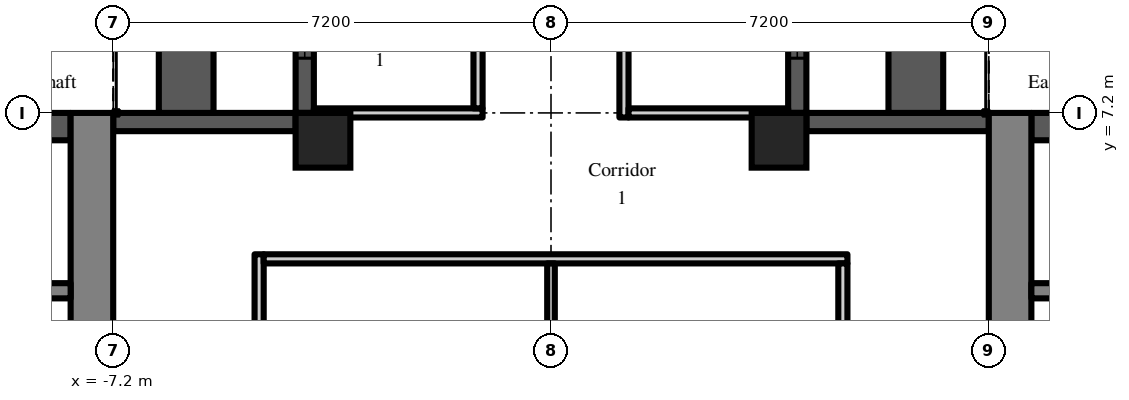
"""IFC4 building model, lengths in metres.
Left out: names, types, materials, properties, quantities, classifications, styles, units other than length and angle.
Written with IfcOpenShell. Run it as: python <this file> out.ifc"""

import sys

from ifc_helpers import new_model, si_unit, direction, frame, frame_2d, origin, origin_2d, place, context, subcontext, project, spatial, rectangle, extrude, element, fill, save


model = new_model("IFC4")
c1 = context("Model", 3, precision=1e-05, world=origin(), true_north=direction((0.0, 1.0)))
c2 = subcontext(c1, "Body", "Model", "MODEL_VIEW")
j1 = project(units=[si_unit("LENGTHUNIT", "METRE"), si_unit("PLANEANGLEUNIT", "RADIAN")], contexts=[c1])
p1 = place(None, origin())
s1 = spatial("IfcSite", under=j1, at=p1, CompositionType="ELEMENT")
p2 = place(p1, origin())
s2 = spatial("IfcBuilding", under=s1, at=p2, CompositionType="ELEMENT")
p3 = place(p2, frame((0.0, 0.0, 156.3)))
s3 = spatial("IfcBuildingStorey", under=s2, at=p3, CompositionType="ELEMENT", Elevation=156.3)
for number, where, z_axis, x_axis in (
    (1, (-3.75, 6.75, 0.0), (0.0, 0.0, 1.0), (1.0, 0.0, 0.0)),
    (2, (3.75, 6.75, 0.0), (0.0, 0.0, 1.0), (1.0, 0.0, 0.0)),
):
    element("IfcColumn", number, at=place(p3, frame(where, z_axis=z_axis, x_axis=x_axis)), inside=s3, PredefinedType="COLUMN", context=c2, shape_type="SweptSolid", body=[
        extrude(rectangle(XDim=0.9, YDim=0.9, at=origin_2d()), origin(), (0.0, 0.0, 1.0), 3.0),
    ])
p4 = place(p3, frame((7.2, 7.05, 0.0), z_axis=(0.0, 0.0, 1.0), x_axis=(-1.0, 0.0, 0.0)))
e3 = element("IfcWall", 3, at=p4, inside=s3, PredefinedType="SOLIDWALL", context=c2, shape_type="SweptSolid", body=[
    extrude(rectangle(XDim=3.0, YDim=0.3, at=frame_2d((1.5, 0.0))), origin(), (0.0, 0.0, 1.0), 2.2),
])
p5 = place(p3, frame((4.05, 7.2, 0.0), z_axis=(0.0, 0.0, 1.0), x_axis=(0.0, 1.0, 0.0)))
e4 = element("IfcWall", 4, at=p5, inside=s3, PredefinedType="SOLIDWALL", context=c2, shape_type="SweptSolid", body=[
    extrude(rectangle(XDim=7.2, YDim=0.3, at=frame_2d((3.6, 0.0))), origin(), (0.0, 0.0, 1.0), 2.2),
])
p6 = place(p5, frame((3.0, 0.0, 0.0)))
e5 = element("IfcOpeningElement", 5, at=p6, cuts=e4, PredefinedType="OPENING", context=c2, shape_type="SweptSolid", body=[
    extrude(rectangle(XDim=1.2, YDim=2.05, at=frame_2d((0.6, 1.025))), frame((0.0, 0.16, 0.0), z_axis=(0.0, -1.0, 0.0), x_axis=(1.0, 0.0, 0.0)), (0.0, 0.0, 1.0), 0.32),
])
p7 = place(p5, frame((0.9, 0.0, 0.2)))
e6 = element("IfcOpeningElement", 6, at=p7, cuts=e4, PredefinedType="OPENING", context=c2, shape_type="SweptSolid", body=[
    extrude(rectangle(XDim=1.8, YDim=1.85, at=frame_2d((0.9, 0.925))), frame((0.0, 0.16, 0.0), z_axis=(0.0, -1.0, 0.0), x_axis=(1.0, 0.0, 0.0)), (0.0, 0.0, 1.0), 0.32),
])
p8 = place(p5, frame((4.5, 0.0, 0.2)))
e7 = element("IfcOpeningElement", 7, at=p8, cuts=e4, PredefinedType="OPENING", context=c2, shape_type="SweptSolid", body=[
    extrude(rectangle(XDim=1.8, YDim=1.85, at=frame_2d((0.9, 0.925))), frame((0.0, 0.16, 0.0), z_axis=(0.0, -1.0, 0.0), x_axis=(1.0, 0.0, 0.0)), (0.0, 0.0, 1.0), 0.32),
])
p9 = place(p3, frame((-4.05, 14.4, 0.0), z_axis=(0.0, 0.0, 1.0), x_axis=(0.0, -1.0, 0.0)))
e8 = element("IfcWall", 8, at=p9, inside=s3, PredefinedType="SOLIDWALL", context=c2, shape_type="SweptSolid", body=[
    extrude(rectangle(XDim=7.2, YDim=0.3, at=frame_2d((3.6, 0.0))), origin(), (0.0, 0.0, 1.0), 2.2),
])
p10 = place(p9, frame((3.0, 0.0, 0.0)))
e9 = element("IfcOpeningElement", 9, at=p10, cuts=e8, PredefinedType="OPENING", context=c2, shape_type="SweptSolid", body=[
    extrude(rectangle(XDim=1.2, YDim=2.05, at=frame_2d((0.6, 1.025))), frame((0.0, 0.16, 0.0), z_axis=(0.0, -1.0, 0.0), x_axis=(1.0, 0.0, 0.0)), (0.0, 0.0, 1.0), 0.32),
])
p11 = place(p9, frame((0.9, 0.0, 0.2)))
e10 = element("IfcOpeningElement", 10, at=p11, cuts=e8, PredefinedType="OPENING", context=c2, shape_type="SweptSolid", body=[
    extrude(rectangle(XDim=1.8, YDim=1.85, at=frame_2d((0.9, 0.925))), frame((0.0, 0.16, 0.0), z_axis=(0.0, -1.0, 0.0), x_axis=(1.0, 0.0, 0.0)), (0.0, 0.0, 1.0), 0.32),
])
p12 = place(p9, frame((4.5, 0.0, 0.2)))
e11 = element("IfcOpeningElement", 11, at=p12, cuts=e8, PredefinedType="OPENING", context=c2, shape_type="SweptSolid", body=[
    extrude(rectangle(XDim=1.8, YDim=1.85, at=frame_2d((0.9, 0.925))), frame((0.0, 0.16, 0.0), z_axis=(0.0, -1.0, 0.0), x_axis=(1.0, 0.0, 0.0)), (0.0, 0.0, 1.0), 0.32),
])
p13 = place(p3, frame((-4.2, 7.05, 0.0), z_axis=(0.0, 0.0, 1.0), x_axis=(-1.0, 0.0, 0.0)))
e12 = element("IfcWall", 12, at=p13, inside=s3, PredefinedType="SOLIDWALL", context=c2, shape_type="SweptSolid", body=[
    extrude(rectangle(XDim=3.0, YDim=0.3, at=frame_2d((1.5, 0.0))), origin(), (0.0, 0.0, 1.0), 2.2),
])
for number, where, z_axis, x_axis in (
    (13, (6.0, 7.2, 0.0), (0.0, 0.0, 1.0), (0.0, 1.0, 0.0)),
    (14, (-6.0, 7.2, 0.0), (0.0, 0.0, 1.0), (0.0, 1.0, 0.0)),
):
    element("IfcWall", number, at=place(p3, frame(where, z_axis=z_axis, x_axis=x_axis)), inside=s3, PredefinedType="PARAPET", context=c2, shape_type="SweptSolid", body=[
        extrude(rectangle(XDim=7.2, YDim=0.9, at=frame_2d((3.6, 0.0))), origin(), (0.0, 0.0, 1.0), 0.8),
    ])
p14 = place(p3, frame((7.55, -7.2, 0.0), z_axis=(0.0, 0.0, 1.0), x_axis=(0.0, 1.0, 0.0)))
e15 = element("IfcWall", 15, at=p14, inside=s3, PredefinedType="SHEAR", context=c2, shape_type="SweptSolid", body=[
    extrude(rectangle(XDim=14.4, YDim=0.7, at=frame_2d((7.2, 0.0))), origin(), (0.0, 0.0, 1.0), 2.6),
])
p15 = place(p14, frame((6.0, 0.0, 0.0)))
e16 = element("IfcOpeningElement", 16, at=p15, cuts=e15, PredefinedType="OPENING", context=c2, shape_type="SweptSolid", body=[
    extrude(rectangle(XDim=2.4, YDim=2.2, at=frame_2d((1.2, 1.1))), frame((0.0, 0.36, 0.0), z_axis=(0.0, -1.0, 0.0), x_axis=(1.0, 0.0, 0.0)), (0.0, 0.0, 1.0), 0.72),
])
p16 = place(p3, frame((7.9, 6.975, 0.0), z_axis=(0.0, 0.0, 1.0), x_axis=(1.0, 0.0, 0.0)))
e17 = element("IfcWall", 17, at=p16, inside=s3, PredefinedType="SHEAR", context=c2, shape_type="SweptSolid", body=[
    extrude(rectangle(XDim=12.95, YDim=0.45, at=frame_2d((6.475, 0.0))), origin(), (0.0, 0.0, 1.0), 2.6),
])
p17 = place(p3, frame((7.9, 4.275, 0.0), z_axis=(0.0, 0.0, 1.0), x_axis=(1.0, 0.0, 0.0)))
e18 = element("IfcWall", 18, at=p17, inside=s3, PredefinedType="SHEAR", context=c2, shape_type="SweptSolid", body=[
    extrude(rectangle(XDim=1.95, YDim=0.25, at=frame_2d((0.975, 0.0))), origin(), (0.0, 0.0, 1.0), 2.6),
])
p18 = place(p3, frame((-7.55, -7.2, 0.0), z_axis=(0.0, 0.0, 1.0), x_axis=(0.0, 1.0, 0.0)))
e19 = element("IfcWall", 19, at=p18, inside=s3, PredefinedType="SHEAR", context=c2, shape_type="SweptSolid", body=[
    extrude(rectangle(XDim=14.4, YDim=0.7, at=frame_2d((7.2, 0.0))), origin(), (0.0, 0.0, 1.0), 2.6),
])
p19 = place(p18, frame((6.0, 0.0, 0.0)))
e20 = element("IfcOpeningElement", 20, at=p19, cuts=e19, PredefinedType="OPENING", context=c2, shape_type="SweptSolid", body=[
    extrude(rectangle(XDim=2.4, YDim=2.2, at=frame_2d((1.2, 1.1))), frame((0.0, 0.36, 0.0), z_axis=(0.0, -1.0, 0.0), x_axis=(1.0, 0.0, 0.0)), (0.0, 0.0, 1.0), 0.72),
])
p20 = place(p3, frame((-7.9, 6.975, 0.0), z_axis=(0.0, 0.0, 1.0), x_axis=(-1.0, 0.0, 0.0)))
e21 = element("IfcWall", 21, at=p20, inside=s3, PredefinedType="SHEAR", context=c2, shape_type="SweptSolid", body=[
    extrude(rectangle(XDim=12.95, YDim=0.45, at=frame_2d((6.475, 0.0))), origin(), (0.0, 0.0, 1.0), 2.6),
])
p21 = place(p3, frame((-7.9, 4.275, 0.0), z_axis=(0.0, 0.0, 1.0), x_axis=(-1.0, 0.0, 0.0)))
e22 = element("IfcWall", 22, at=p21, inside=s3, PredefinedType="SHEAR", context=c2, shape_type="SweptSolid", body=[
    extrude(rectangle(XDim=1.95, YDim=0.25, at=frame_2d((0.975, 0.0))), origin(), (0.0, 0.0, 1.0), 2.6),
])
p22 = place(p3, frame((-4.8, -4.875, 0.0), z_axis=(0.0, 0.0, 1.0), x_axis=(0.0, 1.0, 0.0)))
e23 = element("IfcWall", 23, at=p22, inside=s3, PredefinedType="PARTITIONING", context=c2, shape_type="SweptSolid", body=[
    extrude(rectangle(XDim=9.75, YDim=0.15, at=frame_2d((4.875, 0.0))), origin(), (0.0, 0.0, 1.0), 2.6),
])
p23 = place(p22, frame((5.575, 0.0, 0.0)))
e24 = element("IfcOpeningElement", 24, at=p23, cuts=e23, PredefinedType="OPENING", context=c2, shape_type="SweptSolid", body=[
    extrude(rectangle(XDim=1.0, YDim=2.1, at=frame_2d((0.5, 1.05))), frame((0.0, 0.085, 0.0), z_axis=(0.0, -1.0, 0.0), x_axis=(1.0, 0.0, 0.0)), (0.0, 0.0, 1.0), 0.17),
])
p24 = place(p3, frame((-4.725, 4.8, 0.0), z_axis=(0.0, 0.0, 1.0), x_axis=(1.0, 0.0, 0.0)))
e25 = element("IfcWall", 25, at=p24, inside=s3, PredefinedType="PARTITIONING", context=c2, shape_type="SweptSolid", body=[
    extrude(rectangle(XDim=9.6, YDim=0.15, at=frame_2d((4.8, 0.0))), origin(), (0.0, 0.0, 1.0), 2.6),
])
p25 = place(p3, frame((-3.9, 7.2, 0.0), z_axis=(0.0, 0.0, 1.0), x_axis=(1.0, 0.0, 0.0)))
e26 = element("IfcWall", 26, at=p25, inside=s3, PredefinedType="PARTITIONING", context=c2, shape_type="SweptSolid", body=[
    extrude(rectangle(XDim=2.775, YDim=0.15, at=frame_2d((1.387, 0.0))), origin(), (0.0, 0.0, 1.0), 2.6),
])
p26 = place(p3, frame((-1.2, 7.275, 0.0), z_axis=(0.0, 0.0, 1.0), x_axis=(0.0, 1.0, 0.0)))
e27 = element("IfcWall", 27, at=p26, inside=s3, PredefinedType="PARTITIONING", context=c2, shape_type="SweptSolid", body=[
    extrude(rectangle(XDim=14.025, YDim=0.15, at=frame_2d((7.013, 0.0))), origin(), (0.0, 0.0, 1.0), 2.6),
])
p27 = place(p26, frame((5.275, 0.0, 0.0)))
e28 = element("IfcOpeningElement", 28, at=p27, cuts=e27, PredefinedType="OPENING", context=c2, shape_type="SweptSolid", body=[
    extrude(rectangle(XDim=0.9, YDim=2.1, at=frame_2d((0.45, 1.05))), frame((0.0, 0.085, 0.0), z_axis=(0.0, -1.0, 0.0), x_axis=(1.0, 0.0, 0.0)), (0.0, 0.0, 1.0), 0.17),
])
p28 = place(p26, frame((1.675, 0.0, 0.0)))
e29 = element("IfcOpeningElement", 29, at=p28, cuts=e27, PredefinedType="OPENING", context=c2, shape_type="SweptSolid", body=[
    extrude(rectangle(XDim=0.9, YDim=2.1, at=frame_2d((0.45, 1.05))), frame((0.0, 0.085, 0.0), z_axis=(0.0, -1.0, 0.0), x_axis=(1.0, 0.0, 0.0)), (0.0, 0.0, 1.0), 0.17),
])
p29 = place(p26, frame((7.575, 0.0, 0.0)))
e30 = element("IfcOpeningElement", 30, at=p29, cuts=e27, PredefinedType="OPENING", context=c2, shape_type="SweptSolid", body=[
    extrude(rectangle(XDim=0.9, YDim=2.1, at=frame_2d((0.45, 1.05))), frame((0.0, 0.085, 0.0), z_axis=(0.0, -1.0, 0.0), x_axis=(1.0, 0.0, 0.0)), (0.0, 0.0, 1.0), 0.17),
])
p30 = place(p26, frame((9.375, 0.0, 0.0)))
e31 = element("IfcOpeningElement", 31, at=p30, cuts=e27, PredefinedType="OPENING", context=c2, shape_type="SweptSolid", body=[
    extrude(rectangle(XDim=0.9, YDim=2.1, at=frame_2d((0.45, 1.05))), frame((0.0, 0.085, 0.0), z_axis=(0.0, -1.0, 0.0), x_axis=(1.0, 0.0, 0.0)), (0.0, 0.0, 1.0), 0.17),
])
p31 = place(p26, frame((11.175, 0.0, 0.0)))
e32 = element("IfcOpeningElement", 32, at=p31, cuts=e27, PredefinedType="OPENING", context=c2, shape_type="SweptSolid", body=[
    extrude(rectangle(XDim=0.9, YDim=2.1, at=frame_2d((0.45, 1.05))), frame((0.0, 0.085, 0.0), z_axis=(0.0, -1.0, 0.0), x_axis=(1.0, 0.0, 0.0)), (0.0, 0.0, 1.0), 0.17),
])
p32 = place(p26, frame((12.825, 0.0, 0.0)))
e33 = element("IfcOpeningElement", 33, at=p32, cuts=e27, PredefinedType="OPENING", context=c2, shape_type="SweptSolid", body=[
    extrude(rectangle(XDim=0.9, YDim=2.1, at=frame_2d((0.45, 1.05))), frame((0.0, 0.085, 0.0), z_axis=(0.0, -1.0, 0.0), x_axis=(1.0, 0.0, 0.0)), (0.0, 0.0, 1.0), 0.17),
])
p33 = place(p3, frame((0.0, -2.325, 0.0), z_axis=(0.0, 0.0, 1.0), x_axis=(0.0, 1.0, 0.0)))
e34 = element("IfcWall", 34, at=p33, inside=s3, PredefinedType="PARTITIONING", context=c2, shape_type="SweptSolid", body=[
    extrude(rectangle(XDim=7.05, YDim=0.125, at=frame_2d((3.525, 0.0))), origin(), (0.0, 0.0, 1.0), 2.6),
])
p34 = place(p3, frame((1.2, 7.125, 0.0), z_axis=(0.0, 0.0, 1.0), x_axis=(0.0, 1.0, 0.0)))
e35 = element("IfcWall", 35, at=p34, inside=s3, PredefinedType="PARTITIONING", context=c2, shape_type="SweptSolid", body=[
    extrude(rectangle(XDim=14.175, YDim=0.15, at=frame_2d((7.087, 0.0))), origin(), (0.0, 0.0, 1.0), 2.6),
])
p35 = place(p34, frame((1.425, 0.0, 0.0)))
e36 = element("IfcOpeningElement", 36, at=p35, cuts=e35, PredefinedType="OPENING", context=c2, shape_type="SweptSolid", body=[
    extrude(rectangle(XDim=0.9, YDim=2.1, at=frame_2d((0.45, 1.05))), frame((0.0, 0.085, 0.0), z_axis=(0.0, -1.0, 0.0), x_axis=(1.0, 0.0, 0.0)), (0.0, 0.0, 1.0), 0.17),
])
p36 = place(p34, frame((7.725, 0.0, 0.0)))
e37 = element("IfcOpeningElement", 37, at=p36, cuts=e35, PredefinedType="OPENING", context=c2, shape_type="SweptSolid", body=[
    extrude(rectangle(XDim=0.9, YDim=2.1, at=frame_2d((0.45, 1.05))), frame((0.0, 0.085, 0.0), z_axis=(0.0, -1.0, 0.0), x_axis=(1.0, 0.0, 0.0)), (0.0, 0.0, 1.0), 0.17),
])
p37 = place(p34, frame((9.525, 0.0, 0.0)))
e38 = element("IfcOpeningElement", 38, at=p37, cuts=e35, PredefinedType="OPENING", context=c2, shape_type="SweptSolid", body=[
    extrude(rectangle(XDim=0.9, YDim=2.1, at=frame_2d((0.45, 1.05))), frame((0.0, 0.085, 0.0), z_axis=(0.0, -1.0, 0.0), x_axis=(1.0, 0.0, 0.0)), (0.0, 0.0, 1.0), 0.17),
])
p38 = place(p34, frame((11.325, 0.0, 0.0)))
e39 = element("IfcOpeningElement", 39, at=p38, cuts=e35, PredefinedType="OPENING", context=c2, shape_type="SweptSolid", body=[
    extrude(rectangle(XDim=0.9, YDim=2.1, at=frame_2d((0.45, 1.05))), frame((0.0, 0.085, 0.0), z_axis=(0.0, -1.0, 0.0), x_axis=(1.0, 0.0, 0.0)), (0.0, 0.0, 1.0), 0.17),
])
p39 = place(p34, frame((12.975, 0.0, 0.0)))
e40 = element("IfcOpeningElement", 40, at=p39, cuts=e35, PredefinedType="OPENING", context=c2, shape_type="SweptSolid", body=[
    extrude(rectangle(XDim=0.9, YDim=2.1, at=frame_2d((0.45, 1.05))), frame((0.0, 0.085, 0.0), z_axis=(0.0, -1.0, 0.0), x_axis=(1.0, 0.0, 0.0)), (0.0, 0.0, 1.0), 0.17),
])
p40 = place(p3, frame((1.275, 7.2, 0.0), z_axis=(0.0, 0.0, 1.0), x_axis=(1.0, 0.0, 0.0)))
e41 = element("IfcWall", 41, at=p40, inside=s3, PredefinedType="PARTITIONING", context=c2, shape_type="SweptSolid", body=[
    extrude(rectangle(XDim=2.625, YDim=0.15, at=frame_2d((1.312, 0.0))), origin(), (0.0, 0.0, 1.0), 2.6),
])
p41 = place(p3, frame((4.8, -4.725, 0.0), z_axis=(0.0, 0.0, 1.0), x_axis=(0.0, 1.0, 0.0)))
e42 = element("IfcWall", 42, at=p41, inside=s3, PredefinedType="PARTITIONING", context=c2, shape_type="SweptSolid", body=[
    extrude(rectangle(XDim=9.45, YDim=0.15, at=frame_2d((4.725, 0.0))), origin(), (0.0, 0.0, 1.0), 2.6),
])
p42 = place(p41, frame((5.025, 0.0, 0.0)))
e43 = element("IfcOpeningElement", 43, at=p42, cuts=e42, PredefinedType="OPENING", context=c2, shape_type="SweptSolid", body=[
    extrude(rectangle(XDim=1.8, YDim=2.1, at=frame_2d((0.9, 1.05))), frame((0.0, 0.085, 0.0), z_axis=(0.0, -1.0, 0.0), x_axis=(1.0, 0.0, 0.0)), (0.0, 0.0, 1.0), 0.17),
])
p43 = place(p7, origin())
e44 = element("IfcWindow", 44, at=p43, inside=s3, PartitioningType="SINGLE_PANEL", PredefinedType="WINDOW", context=c2, shape_type="SweptSolid", body=[
    extrude(rectangle(XDim=1.8, YDim=1.85, at=frame_2d((0.9, 0.925))), frame((0.0, 0.03, 0.0), z_axis=(0.0, -1.0, 0.0), x_axis=(1.0, 0.0, 0.0)), (0.0, 0.0, 1.0), 0.06),
])
fill(e6, e44)
p44 = place(p12, origin())
e45 = element("IfcWindow", 45, at=p44, inside=s3, PartitioningType="SINGLE_PANEL", PredefinedType="WINDOW", context=c2, shape_type="SweptSolid", body=[
    extrude(rectangle(XDim=1.8, YDim=1.85, at=frame_2d((0.9, 0.925))), frame((0.0, 0.03, 0.0), z_axis=(0.0, -1.0, 0.0), x_axis=(1.0, 0.0, 0.0)), (0.0, 0.0, 1.0), 0.06),
])
fill(e11, e45)
save(model, sys.argv[1])
